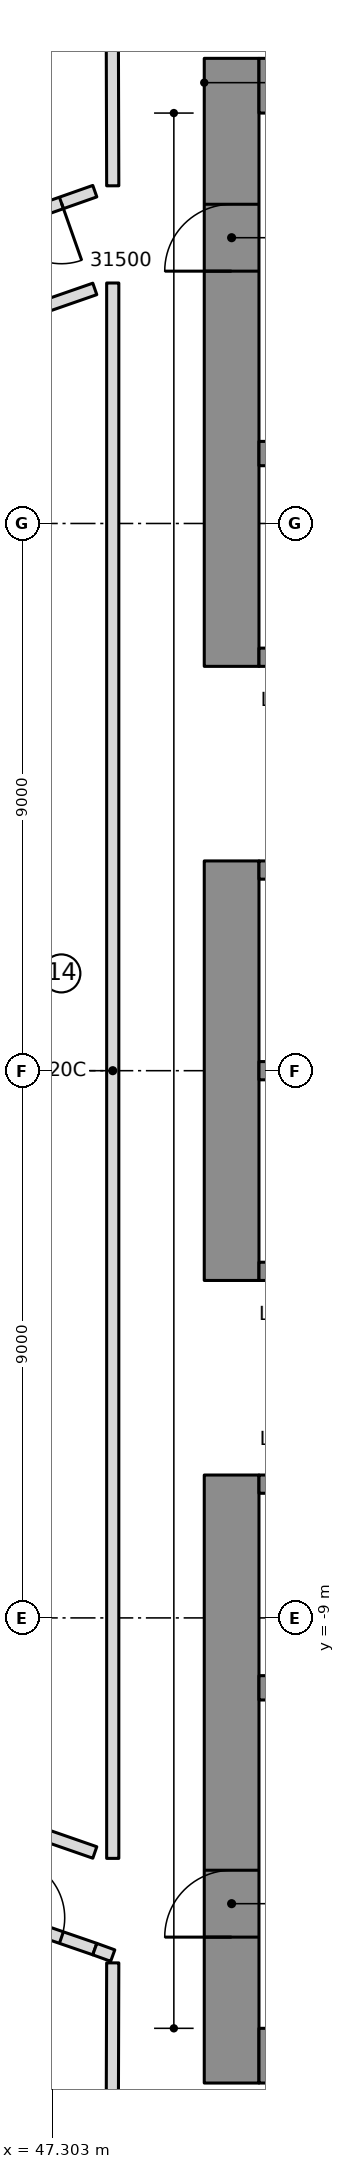
"""IFC4 building model, lengths in metres.
Left out: names, types, materials, properties, quantities, classifications, styles, units other than length and angle.
Written with IfcOpenShell. Run it as: python <this file> out.ifc"""

import sys

from ifc_helpers import new_model, si_unit, direction, frame, frame_2d, origin, place, context, subcontext, project, spatial, rectangle, extrude, element, fill, save


model = new_model("IFC4")
c1 = context("Model", 3, precision=1e-05, world=origin(), true_north=direction((0.0, 1.0)))
c2 = subcontext(c1, "Body", "Model", "MODEL_VIEW")
j1 = project(units=[si_unit("LENGTHUNIT", "METRE"), si_unit("PLANEANGLEUNIT", "RADIAN")], contexts=[c1])
p1 = place(None, origin())
s1 = spatial("IfcSite", under=j1, at=p1, CompositionType="ELEMENT")
p2 = place(p1, origin())
s2 = spatial("IfcBuilding", under=s1, at=p2, CompositionType="ELEMENT")
p3 = place(p2, frame((0.0, 0.0, 162.15)))
s3 = spatial("IfcBuildingStorey", under=s2, at=p3, CompositionType="ELEMENT", Elevation=162.15)
p4 = place(p3, frame((50.25, 6.65, 0.0), z_axis=(0.0, 0.0, 1.0), x_axis=(0.0, 1.0, 0.0)))
e1 = element("IfcWall", 1, at=p4, inside=s3, PredefinedType="SHEAR", context=c2, shape_type="SweptSolid", body=[
    extrude(rectangle(XDim=10.0, YDim=0.9, at=frame_2d((5.0, 0.0))), origin(), (0.0, 0.0, 1.0), 3.55),
])
p5 = place(p4, frame((6.5, 0.0, 0.0)))
e2 = element("IfcOpeningElement", 2, at=p5, cuts=e1, PredefinedType="OPENING", context=c2, shape_type="SweptSolid", body=[
    extrude(rectangle(XDim=1.1, YDim=2.1, at=frame_2d((0.55, 1.05))), frame((0.0, 0.46, 0.0), z_axis=(0.0, -1.0, 0.0), x_axis=(1.0, 0.0, 0.0)), (0.0, 0.0, 1.0), 0.92),
])
p6 = place(p3, frame((50.25, -3.45, 0.0), z_axis=(0.0, 0.0, 1.0), x_axis=(0.0, 1.0, 0.0)))
e3 = element("IfcWall", 3, at=p6, inside=s3, PredefinedType="SHEAR", context=c2, shape_type="SweptSolid", body=[
    extrude(rectangle(XDim=6.9, YDim=0.9, at=frame_2d((3.45, 0.0))), origin(), (0.0, 0.0, 1.0), 3.55),
])
p7 = place(p3, frame((50.25, -16.65, 0.0), z_axis=(0.0, 0.0, 1.0), x_axis=(0.0, 1.0, 0.0)))
e4 = element("IfcWall", 4, at=p7, inside=s3, PredefinedType="SHEAR", context=c2, shape_type="SweptSolid", body=[
    extrude(rectangle(XDim=10.0, YDim=0.9, at=frame_2d((5.0, 0.0))), origin(), (0.0, 0.0, 1.0), 3.55),
])
p8 = place(p7, frame((2.4, 0.0, 0.0)))
e5 = element("IfcOpeningElement", 5, at=p8, cuts=e4, PredefinedType="OPENING", context=c2, shape_type="SweptSolid", body=[
    extrude(rectangle(XDim=1.1, YDim=2.1, at=frame_2d((0.55, 1.05))), frame((0.0, 0.46, 0.0), z_axis=(0.0, -1.0, 0.0), x_axis=(1.0, 0.0, 0.0)), (0.0, 0.0, 1.0), 0.92),
])
for number, where, z_axis, x_axis in (
    (6, (50.7, 16.2, 0.0), (0.0, 0.0, 1.0), (1.0, 0.0, 0.0)),
    (7, (50.7, -16.2, 0.0), (0.0, 0.0, 1.0), (1.0, 0.0, 0.0)),
):
    element("IfcWall", number, at=place(p3, frame(where, z_axis=z_axis, x_axis=x_axis)), inside=s3, PredefinedType="SHEAR", context=c2, shape_type="SweptSolid", body=[
        extrude(rectangle(XDim=13.92, YDim=0.9, at=frame_2d((6.96, 0.0))), origin(), (0.0, 0.0, 1.0), 3.55),
    ])
p9 = place(p3, frame((50.7, 10.15, 0.0), z_axis=(0.0, 0.0, 1.0), x_axis=(1.0, 0.0, 0.0)))
e8 = element("IfcWall", 8, at=p9, inside=s3, PredefinedType="SHEAR", context=c2, shape_type="SweptSolid", body=[
    extrude(rectangle(XDim=13.02, YDim=0.4, at=frame_2d((6.51, 0.0))), origin(), (0.0, 0.0, 1.0), 3.55),
])
p10 = place(p9, frame((0.7, 0.0, 0.0)))
e9 = element("IfcOpeningElement", 9, at=p10, cuts=e8, PredefinedType="OPENING", context=c2, shape_type="SweptSolid", body=[
    extrude(rectangle(XDim=1.1, YDim=2.1, at=frame_2d((0.55, 1.05))), frame((0.0, 0.21, 0.0), z_axis=(0.0, -1.0, 0.0), x_axis=(1.0, 0.0, 0.0)), (0.0, 0.0, 1.0), 0.42),
])
p11 = place(p9, frame((3.5, 0.0, 0.0)))
e10 = element("IfcOpeningElement", 10, at=p11, cuts=e8, PredefinedType="OPENING", context=c2, shape_type="SweptSolid", body=[
    extrude(rectangle(XDim=1.1, YDim=2.1, at=frame_2d((0.55, 1.05))), frame((0.0, 0.21, 0.0), z_axis=(0.0, -1.0, 0.0), x_axis=(1.0, 0.0, 0.0)), (0.0, 0.0, 1.0), 0.42),
])
p12 = place(p3, frame((50.7, -10.15, 0.0), z_axis=(0.0, 0.0, 1.0), x_axis=(1.0, 0.0, 0.0)))
e11 = element("IfcWall", 11, at=p12, inside=s3, PredefinedType="SHEAR", context=c2, shape_type="SweptSolid", body=[
    extrude(rectangle(XDim=13.02, YDim=0.4, at=frame_2d((6.51, 0.0))), origin(), (0.0, 0.0, 1.0), 3.55),
])
p13 = place(p3, frame((50.7, 0.0, 0.0), z_axis=(0.0, 0.0, 1.0), x_axis=(1.0, 0.0, 0.0)))
e12 = element("IfcWall", 12, at=p13, inside=s3, PredefinedType="SHEAR", context=c2, shape_type="SweptSolid", body=[
    extrude(rectangle(XDim=10.9, YDim=0.3, at=frame_2d((5.45, 0.0))), origin(), (0.0, 0.0, 1.0), 3.55),
])
p14 = place(p3, frame((50.7, 3.3, 0.0), z_axis=(0.0, 0.0, 1.0), x_axis=(1.0, 0.0, 0.0)))
e13 = element("IfcWall", 13, at=p14, inside=s3, PredefinedType="SHEAR", context=c2, shape_type="SweptSolid", body=[
    extrude(rectangle(XDim=10.9, YDim=0.3, at=frame_2d((5.45, 0.0))), origin(), (0.0, 0.0, 1.0), 3.55),
])
p15 = place(p14, frame((0.8, 0.0, 0.0)))
e14 = element("IfcOpeningElement", 14, at=p15, cuts=e13, PredefinedType="OPENING", context=c2, shape_type="SweptSolid", body=[
    extrude(rectangle(XDim=0.9, YDim=2.1, at=frame_2d((0.45, 1.05))), frame((0.0, 0.16, 0.0), z_axis=(0.0, -1.0, 0.0), x_axis=(1.0, 0.0, 0.0)), (0.0, 0.0, 1.0), 0.32),
])
p16 = place(p14, frame((3.6, 0.0, 0.0)))
e15 = element("IfcOpeningElement", 15, at=p16, cuts=e13, PredefinedType="OPENING", context=c2, shape_type="SweptSolid", body=[
    extrude(rectangle(XDim=0.9, YDim=2.1, at=frame_2d((0.45, 1.05))), frame((0.0, 0.16, 0.0), z_axis=(0.0, -1.0, 0.0), x_axis=(1.0, 0.0, 0.0)), (0.0, 0.0, 1.0), 0.32),
])
p17 = place(p14, frame((6.4, 0.0, 0.0)))
e16 = element("IfcOpeningElement", 16, at=p17, cuts=e13, PredefinedType="OPENING", context=c2, shape_type="SweptSolid", body=[
    extrude(rectangle(XDim=0.9, YDim=2.1, at=frame_2d((0.45, 1.05))), frame((0.0, 0.16, 0.0), z_axis=(0.0, -1.0, 0.0), x_axis=(1.0, 0.0, 0.0)), (0.0, 0.0, 1.0), 0.32),
])
p18 = place(p14, frame((9.2, 0.0, 0.0)))
e17 = element("IfcOpeningElement", 17, at=p18, cuts=e13, PredefinedType="OPENING", context=c2, shape_type="SweptSolid", body=[
    extrude(rectangle(XDim=0.9, YDim=2.1, at=frame_2d((0.45, 1.05))), frame((0.0, 0.16, 0.0), z_axis=(0.0, -1.0, 0.0), x_axis=(1.0, 0.0, 0.0)), (0.0, 0.0, 1.0), 0.32),
])
p19 = place(p3, frame((50.7, 6.8, 0.0), z_axis=(0.0, 0.0, 1.0), x_axis=(1.0, 0.0, 0.0)))
e18 = element("IfcWall", 18, at=p19, inside=s3, PredefinedType="SHEAR", context=c2, shape_type="SweptSolid", body=[
    extrude(rectangle(XDim=10.9, YDim=0.3, at=frame_2d((5.45, 0.0))), origin(), (0.0, 0.0, 1.0), 3.55),
])
p20 = place(p19, frame((6.3, 0.0, 0.0)))
e19 = element("IfcOpeningElement", 19, at=p20, cuts=e18, PredefinedType="OPENING", context=c2, shape_type="SweptSolid", body=[
    extrude(rectangle(XDim=1.1, YDim=2.1, at=frame_2d((0.55, 1.05))), frame((0.0, 0.16, 0.0), z_axis=(0.0, -1.0, 0.0), x_axis=(1.0, 0.0, 0.0)), (0.0, 0.0, 1.0), 0.32),
])
p21 = place(p19, frame((9.1, 0.0, 0.0)))
e20 = element("IfcOpeningElement", 20, at=p21, cuts=e18, PredefinedType="OPENING", context=c2, shape_type="SweptSolid", body=[
    extrude(rectangle(XDim=1.1, YDim=2.1, at=frame_2d((0.55, 1.05))), frame((0.0, 0.16, 0.0), z_axis=(0.0, -1.0, 0.0), x_axis=(1.0, 0.0, 0.0)), (0.0, 0.0, 1.0), 0.32),
])
p22 = place(p3, frame((50.7, -3.3, 0.0), z_axis=(0.0, 0.0, 1.0), x_axis=(1.0, 0.0, 0.0)))
e21 = element("IfcWall", 21, at=p22, inside=s3, PredefinedType="SHEAR", context=c2, shape_type="SweptSolid", body=[
    extrude(rectangle(XDim=10.9, YDim=0.3, at=frame_2d((5.45, 0.0))), origin(), (0.0, 0.0, 1.0), 3.55),
])
p23 = place(p22, frame((9.2, 0.0, 0.0)))
e22 = element("IfcOpeningElement", 22, at=p23, cuts=e21, PredefinedType="OPENING", context=c2, shape_type="SweptSolid", body=[
    extrude(rectangle(XDim=0.9, YDim=2.1, at=frame_2d((0.45, 1.05))), frame((0.0, 0.16, 0.0), z_axis=(0.0, -1.0, 0.0), x_axis=(1.0, 0.0, 0.0)), (0.0, 0.0, 1.0), 0.32),
])
p24 = place(p3, frame((50.7, -6.8, 0.0), z_axis=(0.0, 0.0, 1.0), x_axis=(1.0, 0.0, 0.0)))
e23 = element("IfcWall", 23, at=p24, inside=s3, PredefinedType="SHEAR", context=c2, shape_type="SweptSolid", body=[
    extrude(rectangle(XDim=10.9, YDim=0.3, at=frame_2d((5.45, 0.0))), origin(), (0.0, 0.0, 1.0), 3.55),
])
p25 = place(p24, frame((0.7, 0.0, 0.0)))
e24 = element("IfcOpeningElement", 24, at=p25, cuts=e23, PredefinedType="OPENING", context=c2, shape_type="SweptSolid", body=[
    extrude(rectangle(XDim=1.1, YDim=2.1, at=frame_2d((0.55, 1.05))), frame((0.0, 0.16, 0.0), z_axis=(0.0, -1.0, 0.0), x_axis=(1.0, 0.0, 0.0)), (0.0, 0.0, 1.0), 0.32),
])
p26 = place(p24, frame((3.5, 0.0, 0.0)))
e25 = element("IfcOpeningElement", 25, at=p26, cuts=e23, PredefinedType="OPENING", context=c2, shape_type="SweptSolid", body=[
    extrude(rectangle(XDim=1.1, YDim=2.1, at=frame_2d((0.55, 1.05))), frame((0.0, 0.16, 0.0), z_axis=(0.0, -1.0, 0.0), x_axis=(1.0, 0.0, 0.0)), (0.0, 0.0, 1.0), 0.32),
])
p27 = place(p24, frame((6.3, 0.0, 0.0)))
e26 = element("IfcOpeningElement", 26, at=p27, cuts=e23, PredefinedType="OPENING", context=c2, shape_type="SweptSolid", body=[
    extrude(rectangle(XDim=1.1, YDim=2.1, at=frame_2d((0.55, 1.05))), frame((0.0, 0.16, 0.0), z_axis=(0.0, -1.0, 0.0), x_axis=(1.0, 0.0, 0.0)), (0.0, 0.0, 1.0), 0.32),
])
p28 = place(p24, frame((9.1, 0.0, 0.0)))
e27 = element("IfcOpeningElement", 27, at=p28, cuts=e23, PredefinedType="OPENING", context=c2, shape_type="SweptSolid", body=[
    extrude(rectangle(XDim=1.1, YDim=2.1, at=frame_2d((0.55, 1.05))), frame((0.0, 0.16, 0.0), z_axis=(0.0, -1.0, 0.0), x_axis=(1.0, 0.0, 0.0)), (0.0, 0.0, 1.0), 0.32),
])
p29 = place(p3, frame((48.0, 14.466, 0.0), z_axis=(0.0, 0.0, 1.0), x_axis=(-0.94307168041, -0.332589545248, 0.0)))
e28 = element("IfcWall", 28, at=p29, inside=s3, PredefinedType="PARTITIONING", context=c2, shape_type="SweptSolid", body=[
    extrude(rectangle(XDim=2.437, YDim=0.2, at=frame_2d((1.219, 0.0))), origin(), (0.0, 0.0, 1.0), 3.15),
])
p30 = place(p29, frame((0.582, 0.0, 0.0)))
e29 = element("IfcOpeningElement", 29, at=p30, cuts=e28, PredefinedType="OPENING", context=c2, shape_type="SweptSolid", body=[
    extrude(rectangle(XDim=1.0, YDim=2.1, at=frame_2d((0.5, 1.05))), frame((0.0, 0.11, 0.0), z_axis=(0.0, -1.0, 0.0), x_axis=(1.0, 0.0, 0.0)), (0.0, 0.0, 1.0), 0.22),
])
p31 = place(p3, frame((45.702, -13.655, 0.0), z_axis=(0.0, 0.0, 1.0), x_axis=(0.945472196346, -0.325702818435, 0.0)))
e30 = element("IfcWall", 30, at=p31, inside=s3, PredefinedType="PARTITIONING", context=c2, shape_type="SweptSolid", body=[
    extrude(rectangle(XDim=2.431, YDim=0.2, at=frame_2d((1.215, 0.0))), origin(), (0.0, 0.0, 1.0), 3.15),
])
p32 = place(p31, frame((0.85, 0.0, 0.0)))
e31 = element("IfcOpeningElement", 31, at=p32, cuts=e30, PredefinedType="OPENING", context=c2, shape_type="SweptSolid", body=[
    extrude(rectangle(XDim=1.0, YDim=2.1, at=frame_2d((0.5, 1.05))), frame((0.0, 0.11, 0.0), z_axis=(0.0, -1.0, 0.0), x_axis=(1.0, 0.0, 0.0)), (0.0, 0.0, 1.0), 0.22),
])
for number, where, z_axis, x_axis in (
    (32, (46.781, 12.434, 0.0), (0.0, 0.0, 1.0), (0.945, 0.328, 0.0)),
    (33, (48.0, -12.858, 0.0), (0.0, 0.0, 1.0), (-0.945, 0.328, 0.0)),
):
    element("IfcWall", number, at=place(p3, frame(where, z_axis=z_axis, x_axis=x_axis)), inside=s3, PredefinedType="PARTITIONING", context=c2, shape_type="SweptSolid", body=[
        extrude(rectangle(XDim=1.29, YDim=0.2, at=frame_2d((0.645, 0.0))), origin(), (0.0, 0.0, 1.0), 3.15),
    ])
p33 = place(p3, frame((48.295, 12.955, 0.0), z_axis=(0.0, 0.0, 1.0), x_axis=(0.0, -1.0, 0.0)))
e34 = element("IfcWall", 34, at=p33, inside=s3, PredefinedType="PARTITIONING", context=c2, shape_type="SweptSolid", body=[
    extrude(rectangle(XDim=25.91, YDim=0.2, at=frame_2d((12.955, 0.0))), origin(), (0.0, 0.0, 1.0), 3.15),
])
p34 = place(p3, frame((48.279, 20.289, 0.0), z_axis=(0.0, 0.0, 1.0), x_axis=(0.002809695168, -0.999996052799, 0.0)))
e35 = element("IfcWall", 35, at=p34, inside=s3, PredefinedType="PARTITIONING", context=c2, shape_type="SweptSolid", body=[
    extrude(rectangle(XDim=5.735, YDim=0.2, at=frame_2d((2.867, 0.0))), origin(), (0.0, 0.0, 1.0), 3.15),
])
p35 = place(p3, frame((48.0, -14.447, 0.0), z_axis=(0.0, 0.0, 1.0), x_axis=(0.940111128087, -0.3408681077, 0.0)))
e36 = element("IfcWall", 36, at=p35, inside=s3, PredefinedType="PARTITIONING", context=c2, shape_type="SweptSolid", body=[
    extrude(rectangle(XDim=0.314, YDim=0.2, at=frame_2d((0.157, 0.0))), origin(), (0.0, 0.0, 1.0), 3.15),
])
p36 = place(p3, frame((48.295, -14.674, 0.0), z_axis=(0.0, 0.0, 1.0), x_axis=(-0.00286967817, -0.999995882465, 0.0)))
e37 = element("IfcWall", 37, at=p36, inside=s3, PredefinedType="PARTITIONING", context=c2, shape_type="SweptSolid", body=[
    extrude(rectangle(XDim=5.615, YDim=0.2, at=frame_2d((2.808, 0.0))), origin(), (0.0, 0.0, 1.0), 3.15),
])
p37 = place(p30, origin())
e38 = element("IfcDoor", 38, at=p37, inside=s3, OperationType="SINGLE_SWING_LEFT", PredefinedType="DOOR", context=c2, shape_type="SweptSolid", body=[
    extrude(rectangle(XDim=1.0, YDim=2.1, at=frame_2d((0.5, 1.05))), frame((0.0, 0.025, 0.0), z_axis=(0.0, -1.0, 0.0), x_axis=(1.0, 0.0, 0.0)), (0.0, 0.0, 1.0), 0.05),
])
fill(e29, e38)
p38 = place(p32, origin())
e39 = element("IfcDoor", 39, at=p38, inside=s3, OperationType="SINGLE_SWING_LEFT", PredefinedType="DOOR", context=c2, shape_type="SweptSolid", body=[
    extrude(rectangle(XDim=1.0, YDim=2.1, at=frame_2d((0.5, 1.05))), frame((0.0, 0.025, 0.0), z_axis=(0.0, -1.0, 0.0), x_axis=(1.0, 0.0, 0.0)), (0.0, 0.0, 1.0), 0.05),
])
fill(e31, e39)
p39 = place(p5, origin())
e40 = element("IfcDoor", 40, at=p39, inside=s3, OperationType="SINGLE_SWING_RIGHT", PredefinedType="DOOR", context=c2, shape_type="SweptSolid", body=[
    extrude(rectangle(XDim=1.1, YDim=2.1, at=frame_2d((0.55, 1.05))), frame((0.0, 0.025, 0.0), z_axis=(0.0, -1.0, 0.0), x_axis=(1.0, 0.0, 0.0)), (0.0, 0.0, 1.0), 0.05),
])
fill(e2, e40)
p40 = place(p8, origin())
e41 = element("IfcDoor", 41, at=p40, inside=s3, OperationType="SINGLE_SWING_RIGHT", PredefinedType="DOOR", context=c2, shape_type="SweptSolid", body=[
    extrude(rectangle(XDim=1.1, YDim=2.1, at=frame_2d((0.55, 1.05))), frame((0.0, 0.025, 0.0), z_axis=(0.0, -1.0, 0.0), x_axis=(1.0, 0.0, 0.0)), (0.0, 0.0, 1.0), 0.05),
])
fill(e5, e41)
save(model, sys.argv[1])
